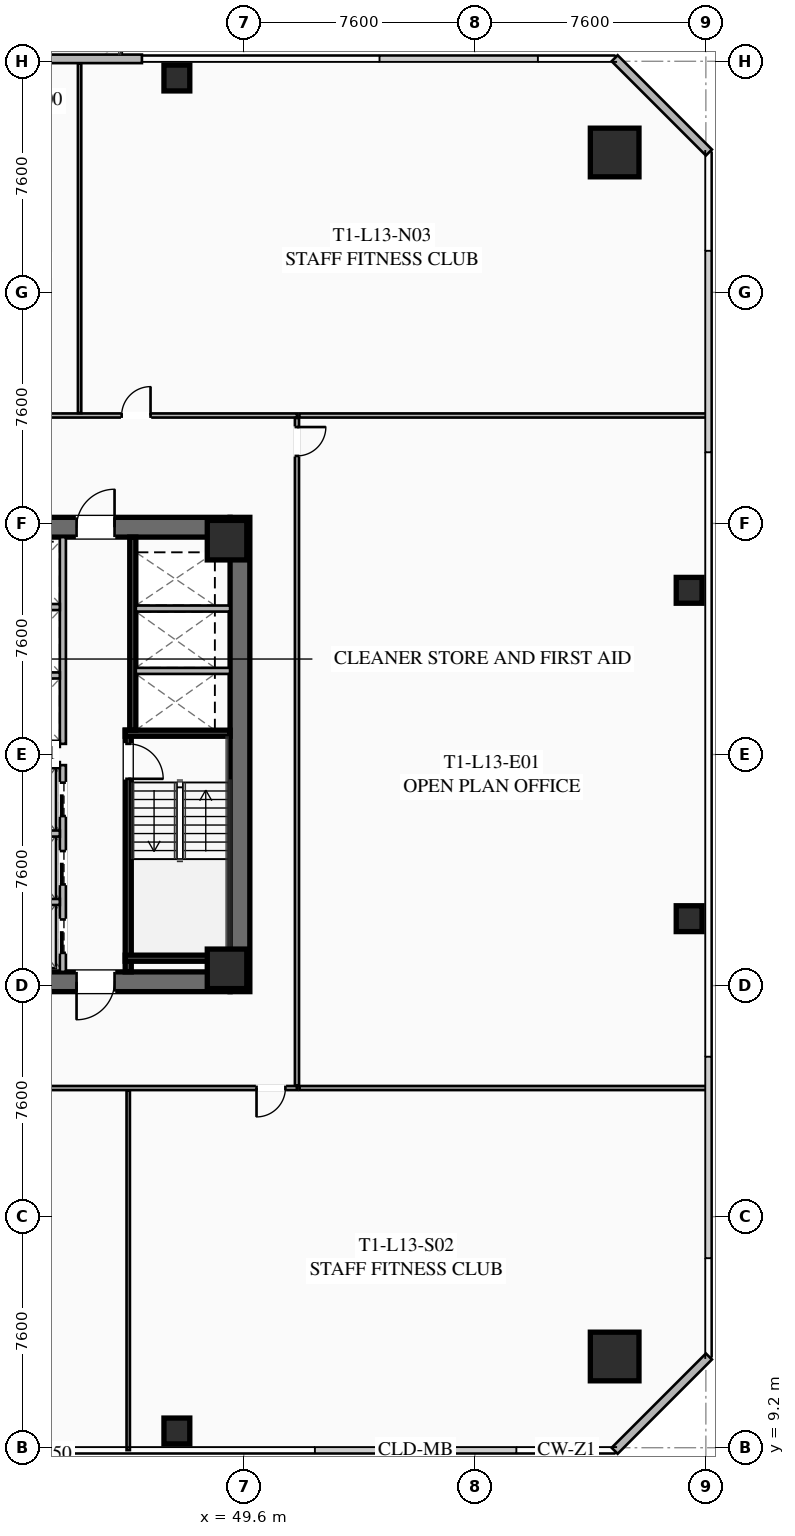
"""IFC4 building model, lengths in metres.
Left out: names, types, materials, properties, quantities, classifications, styles, units other than length and angle.
Written with IfcOpenShell. Run it as: python <this file> out.ifc"""

import sys

from ifc_helpers import new_model, si_unit, direction, frame, frame_2d, origin, origin_2d, place, context, subcontext, project, spatial, rectangle, hollow_rectangle, extrude, element, fill, save


model = new_model("IFC4")
c1 = context("Model", 3, precision=1e-05, world=origin(), true_north=direction((0.0, 1.0)))
c2 = subcontext(c1, "Body", "Model", "MODEL_VIEW")
j1 = project(units=[si_unit("LENGTHUNIT", "METRE"), si_unit("PLANEANGLEUNIT", "RADIAN")], contexts=[c1])
p1 = place(None, origin())
s1 = spatial("IfcSite", under=j1, at=p1, CompositionType="ELEMENT")
p2 = place(p1, origin())
s2 = spatial("IfcBuilding", under=s1, at=p2, CompositionType="ELEMENT")
p3 = place(p2, frame((0.0, 0.0, 53.0)))
s3 = spatial("IfcBuildingStorey", under=s2, at=p3, CompositionType="ELEMENT", Elevation=53.0)
p4 = place(p3, frame((49.475, 39.8, 0.0), z_axis=(0.0, 0.0, 1.0), x_axis=(0.0, -1.0, 0.0)))
e1 = element("IfcWall", 1, at=p4, inside=s3, PredefinedType="SHEAR", context=c2, shape_type="SweptSolid", body=[
    extrude(rectangle(XDim=15.6, YDim=0.65, at=frame_2d((7.8, 0.0))), origin(), (0.0, 0.0, 1.0), 3.55),
])
p5 = place(p3, frame((49.15, 24.525, 0.0), z_axis=(0.0, 0.0, 1.0), x_axis=(-1.0, 0.0, 0.0)))
e2 = element("IfcWall", 2, at=p5, inside=s3, PredefinedType="SHEAR", context=c2, shape_type="SweptSolid", body=[
    extrude(rectangle(XDim=14.3, YDim=0.65, at=frame_2d((7.15, 0.0))), origin(), (0.0, 0.0, 1.0), 3.55),
])
p6 = place(p5, frame((8.85, 0.0, 0.0)))
e3 = element("IfcOpeningElement", 3, at=p6, cuts=e2, PredefinedType="OPENING", context=c2, shape_type="SweptSolid", body=[
    extrude(rectangle(XDim=1.25, YDim=2.25, at=frame_2d((0.625, 1.125))), frame((0.0, 0.335, 0.0), z_axis=(0.0, -1.0, 0.0), x_axis=(1.0, 0.0, 0.0)), (0.0, 0.0, 1.0), 0.67),
])
p7 = place(p5, frame((3.8, 0.0, 0.0)))
e4 = element("IfcOpeningElement", 4, at=p7, cuts=e2, PredefinedType="OPENING", context=c2, shape_type="SweptSolid", body=[
    extrude(rectangle(XDim=1.25, YDim=2.25, at=frame_2d((0.625, 1.125))), frame((0.0, 0.335, 0.0), z_axis=(0.0, -1.0, 0.0), x_axis=(1.0, 0.0, 0.0)), (0.0, 0.0, 1.0), 0.67),
])
p8 = place(p3, frame((34.85, 39.475, 0.0), z_axis=(0.0, 0.0, 1.0), x_axis=(1.0, 0.0, 0.0)))
e5 = element("IfcWall", 5, at=p8, inside=s3, PredefinedType="SHEAR", context=c2, shape_type="SweptSolid", body=[
    extrude(rectangle(XDim=14.3, YDim=0.65, at=frame_2d((7.15, 0.0))), origin(), (0.0, 0.0, 1.0), 3.55),
])
p9 = place(p8, frame((4.2, 0.0, 0.0)))
e6 = element("IfcOpeningElement", 6, at=p9, cuts=e5, PredefinedType="OPENING", context=c2, shape_type="SweptSolid", body=[
    extrude(rectangle(XDim=1.25, YDim=2.25, at=frame_2d((0.625, 1.125))), frame((0.0, 0.335, 0.0), z_axis=(0.0, -1.0, 0.0), x_axis=(1.0, 0.0, 0.0)), (0.0, 0.0, 1.0), 0.67),
])
p10 = place(p8, frame((9.25, 0.0, 0.0)))
e7 = element("IfcOpeningElement", 7, at=p10, cuts=e5, PredefinedType="OPENING", context=c2, shape_type="SweptSolid", body=[
    extrude(rectangle(XDim=1.25, YDim=2.25, at=frame_2d((0.625, 1.125))), frame((0.0, 0.335, 0.0), z_axis=(0.0, -1.0, 0.0), x_axis=(1.0, 0.0, 0.0)), (0.0, 0.0, 1.0), 0.67),
])
for number, where, z_axis, x_axis in (
    (8, (49.05, 24.95, 0.0), (0.0, 0.0, 1.0), (1.0, 0.0, 0.0)),
    (9, (49.05, 39.05, 0.0), (0.0, 0.0, 1.0), (1.0, 0.0, 0.0)),
):
    element("IfcColumn", number, at=place(p3, frame(where, z_axis=z_axis, x_axis=x_axis)), inside=s3, PredefinedType="COLUMN", context=c2, shape_type="SweptSolid", body=[
        extrude(hollow_rectangle(XDim=1.3, YDim=1.3, WallThickness=0.05, at=origin_2d()), origin(), (0.0, 0.0, 1.0), 3.35),
    ])
for number, where, z_axis, x_axis in (
    (10, (61.8, 12.2, 0.0), (0.0, 0.0, 1.0), (1.0, 0.0, 0.0)),
    (11, (61.8, 51.8, 0.0), (0.0, 0.0, 1.0), (1.0, 0.0, 0.0)),
):
    element("IfcColumn", number, at=place(p3, frame(where, z_axis=z_axis, x_axis=x_axis)), inside=s3, PredefinedType="COLUMN", context=c2, shape_type="SweptSolid", body=[
        extrude(hollow_rectangle(XDim=1.6, YDim=1.6, WallThickness=0.06, at=origin_2d()), origin(), (0.0, 0.0, 1.0), 3.35),
    ])
for number, where, z_axis, x_axis in (
    (12, (47.4, 9.75, 0.0), (0.0, 0.0, 1.0), (1.0, 0.0, 0.0)),
    (13, (64.25, 26.6, 0.0), (0.0, 0.0, 1.0), (1.0, 0.0, 0.0)),
    (14, (64.25, 37.4, 0.0), (0.0, 0.0, 1.0), (1.0, 0.0, 0.0)),
    (15, (47.4, 54.25, 0.0), (0.0, 0.0, 1.0), (1.0, 0.0, 0.0)),
):
    element("IfcColumn", number, at=place(p3, frame(where, z_axis=z_axis, x_axis=x_axis)), inside=s3, PredefinedType="COLUMN", context=c2, shape_type="SweptSolid", body=[
        extrude(hollow_rectangle(XDim=0.85, YDim=0.85, WallThickness=0.035, at=origin_2d()), origin(), (0.0, 0.0, 1.0), 3.35),
    ])
p11 = place(p3, frame((37.75, 54.88, 0.0), z_axis=(0.0, 0.0, 1.0), x_axis=(1.0, 0.0, 0.0)))
e16 = element("IfcWall", 16, at=p11, inside=s3, PredefinedType="SOLIDWALL", context=c2, shape_type="SweptSolid", body=[
    extrude(rectangle(XDim=8.5, YDim=0.28, at=frame_2d((4.25, 0.0))), origin(), (0.0, 0.0, 1.0), 3.35),
])
p12 = place(p11, frame((3.6, 0.0, 0.0)))
e17 = element("IfcOpeningElement", 17, at=p12, cuts=e16, PredefinedType="OPENING", context=c2, shape_type="SweptSolid", body=[
    extrude(rectangle(XDim=1.3, YDim=2.15, at=frame_2d((0.65, 1.075))), frame((0.0, 0.15, 0.0), z_axis=(0.0, -1.0, 0.0), x_axis=(1.0, 0.0, 0.0)), (0.0, 0.0, 1.0), 0.3),
])
p13 = place(p11, frame((1.46, 0.0, 0.85)))
e18 = element("IfcOpeningElement", 18, at=p13, cuts=e16, PredefinedType="OPENING", context=c2, shape_type="SweptSolid", body=[
    extrude(rectangle(XDim=1.8, YDim=1.92, at=frame_2d((0.9, 0.96))), frame((0.0, 0.15, 0.0), z_axis=(0.0, -1.0, 0.0), x_axis=(1.0, 0.0, 0.0)), (0.0, 0.0, 1.0), 0.3),
])
for number, where, z_axis, x_axis in (
    (19, (61.8, 54.9, 0.0), (0.0, 0.0, 1.0), (0.707, -0.707, 0.0)),
    (20, (64.9, 12.2, 0.0), (0.0, 0.0, 1.0), (-0.707, -0.707, 0.0)),
):
    element("IfcWall", number, at=place(p3, frame(where, z_axis=z_axis, x_axis=x_axis)), inside=s3, PredefinedType="SOLIDWALL", context=c2, shape_type="SweptSolid", body=[
        extrude(rectangle(XDim=4.384, YDim=0.28, at=frame_2d((2.192, 0.0))), origin(), (0.0, 0.0, 1.0), 3.35),
    ])
p14 = place(p3, frame((45.8, 32.8, 0.0), z_axis=(0.0, 0.0, 1.0), x_axis=(0.0, -1.0, 0.0)))
e21 = element("IfcWall", 21, at=p14, inside=s3, PredefinedType="SHEAR", context=c2, shape_type="SweptSolid", body=[
    extrude(rectangle(XDim=7.95, YDim=0.2, at=frame_2d((3.975, 0.0))), origin(), (0.0, 0.0, 1.0), 3.35),
])
p15 = place(p14, frame((0.45, 0.0, 0.0)))
e22 = element("IfcOpeningElement", 22, at=p15, cuts=e21, PredefinedType="OPENING", context=c2, shape_type="SweptSolid", body=[
    extrude(rectangle(XDim=1.15, YDim=2.2, at=frame_2d((0.575, 1.1))), frame((0.0, 0.11, 0.0), z_axis=(0.0, -1.0, 0.0), x_axis=(1.0, 0.0, 0.0)), (0.0, 0.0, 1.0), 0.22),
])
for number, where, z_axis, x_axis in (
    (23, (45.7, 32.7, 0.0), (0.0, 0.0, 1.0), (1.0, 0.0, 0.0)),
    (24, (45.7, 25.3, 0.0), (0.0, 0.0, 1.0), (1.0, 0.0, 0.0)),
):
    element("IfcWall", number, at=place(p3, frame(where, z_axis=z_axis, x_axis=x_axis)), inside=s3, PredefinedType="SHEAR", context=c2, shape_type="SweptSolid", body=[
        extrude(rectangle(XDim=3.45, YDim=0.2, at=frame_2d((1.725, 0.0))), origin(), (0.0, 0.0, 1.0), 3.35),
    ])
p16 = place(p3, frame((45.95, 39.15, 0.0), z_axis=(0.0, 0.0, 1.0), x_axis=(0.0, -1.0, 0.0)))
e25 = element("IfcWall", 25, at=p16, inside=s3, PredefinedType="SHEAR", context=c2, shape_type="SweptSolid", body=[
    extrude(rectangle(XDim=6.35, YDim=0.2, at=frame_2d((3.175, 0.0))), origin(), (0.0, 0.0, 1.0), 3.35),
])
for number, where, z_axis, x_axis in (
    (26, (46.05, 34.75, 0.0), (0.0, 0.0, 1.0), (1.0, 0.0, 0.0)),
    (27, (46.05, 36.8, 0.0), (0.0, 0.0, 1.0), (1.0, 0.0, 0.0)),
):
    element("IfcWall", number, at=place(p3, frame(where, z_axis=z_axis, x_axis=x_axis)), inside=s3, PredefinedType="SOLIDWALL", context=c2, shape_type="SweptSolid", body=[
        extrude(rectangle(XDim=3.1, YDim=0.2, at=frame_2d((1.55, 0.0))), origin(), (0.0, 0.0, 1.0), 3.35),
    ])
p17 = place(p3, frame((43.65, 24.85, 0.0), z_axis=(0.0, 0.0, 1.0), x_axis=(0.0, 1.0, 0.0)))
e28 = element("IfcWall", 28, at=p17, inside=s3, PredefinedType="SOLIDWALL", context=c2, shape_type="SweptSolid", body=[
    extrude(rectangle(XDim=6.8, YDim=0.2, at=frame_2d((3.4, 0.0))), origin(), (0.0, 0.0, 1.0), 3.35),
])
p18 = place(p17, frame((0.625, 0.0, 0.0)))
e29 = element("IfcOpeningElement", 29, at=p18, cuts=e28, PredefinedType="OPENING", context=c2, shape_type="SweptSolid", body=[
    extrude(rectangle(XDim=1.1, YDim=2.2, at=frame_2d((0.55, 1.1))), frame((0.0, 0.11, 0.0), z_axis=(0.0, -1.0, 0.0), x_axis=(1.0, 0.0, 0.0)), (0.0, 0.0, 1.0), 0.22),
])
p19 = place(p17, frame((2.875, 0.0, 0.0)))
e30 = element("IfcOpeningElement", 30, at=p19, cuts=e28, PredefinedType="OPENING", context=c2, shape_type="SweptSolid", body=[
    extrude(rectangle(XDim=1.1, YDim=2.2, at=frame_2d((0.55, 1.1))), frame((0.0, 0.11, 0.0), z_axis=(0.0, -1.0, 0.0), x_axis=(1.0, 0.0, 0.0)), (0.0, 0.0, 1.0), 0.22),
])
p20 = place(p17, frame((5.125, 0.0, 0.0)))
e31 = element("IfcOpeningElement", 31, at=p20, cuts=e28, PredefinedType="OPENING", context=c2, shape_type="SweptSolid", body=[
    extrude(rectangle(XDim=1.1, YDim=2.2, at=frame_2d((0.55, 1.1))), frame((0.0, 0.11, 0.0), z_axis=(0.0, -1.0, 0.0), x_axis=(1.0, 0.0, 0.0)), (0.0, 0.0, 1.0), 0.22),
])
for number, where, z_axis, x_axis in (
    (32, (41.67, 27.15, 0.0), (0.0, 0.0, 1.0), (1.0, 0.0, 0.0)),
    (33, (41.67, 29.4, 0.0), (0.0, 0.0, 1.0), (1.0, 0.0, 0.0)),
    (34, (41.67, 31.65, 0.0), (0.0, 0.0, 1.0), (1.0, 0.0, 0.0)),
):
    element("IfcWall", number, at=place(p3, frame(where, z_axis=z_axis, x_axis=x_axis)), inside=s3, PredefinedType="SOLIDWALL", context=c2, shape_type="SweptSolid", body=[
        extrude(rectangle(XDim=1.88, YDim=0.2, at=frame_2d((0.94, 0.0))), origin(), (0.0, 0.0, 1.0), 3.35),
    ])
p21 = place(p3, frame((43.65, 32.35, 0.0), z_axis=(0.0, 0.0, 1.0), x_axis=(0.0, 1.0, 0.0)))
e35 = element("IfcWall", 35, at=p21, inside=s3, PredefinedType="SOLIDWALL", context=c2, shape_type="SweptSolid", body=[
    extrude(rectangle(XDim=6.8, YDim=0.2, at=frame_2d((3.4, 0.0))), origin(), (0.0, 0.0, 1.0), 3.35),
])
for number, where, z_axis, x_axis in (
    (36, (41.67, 32.35, 0.0), (0.0, 0.0, 1.0), (1.0, 0.0, 0.0)),
    (37, (41.67, 34.6, 0.0), (0.0, 0.0, 1.0), (1.0, 0.0, 0.0)),
    (38, (41.67, 36.85, 0.0), (0.0, 0.0, 1.0), (1.0, 0.0, 0.0)),
):
    element("IfcWall", number, at=place(p3, frame(where, z_axis=z_axis, x_axis=x_axis)), inside=s3, PredefinedType="SOLIDWALL", context=c2, shape_type="SweptSolid", body=[
        extrude(rectangle(XDim=1.88, YDim=0.2, at=frame_2d((0.94, 0.0))), origin(), (0.0, 0.0, 1.0), 3.35),
    ])
p22 = place(p3, frame((22.35, 43.15, 0.0), z_axis=(0.0, 0.0, 1.0), x_axis=(1.0, 0.0, 0.0)))
e39 = element("IfcWall", 39, at=p22, inside=s3, PredefinedType="PARTITIONING", context=c2, shape_type="SweptSolid", body=[
    extrude(rectangle(XDim=29.0, YDim=0.135, at=frame_2d((14.5, 0.0))), origin(), (0.0, 0.0, 1.0), 2.703),
])
p23 = place(p22, frame((0.3, 0.0, 0.0)))
e40 = element("IfcOpeningElement", 40, at=p23, cuts=e39, PredefinedType="OPENING", context=c2, shape_type="SweptSolid", body=[
    extrude(rectangle(XDim=0.95, YDim=2.05, at=frame_2d((0.475, 1.025))), frame((0.0, 0.077, 0.0), z_axis=(0.0, -1.0, 0.0), x_axis=(1.0, 0.0, 0.0)), (0.0, 0.0, 1.0), 0.155),
])
p24 = place(p22, frame((19.263, 0.0, 0.0)))
e41 = element("IfcOpeningElement", 41, at=p24, cuts=e39, PredefinedType="OPENING", context=c2, shape_type="SweptSolid", body=[
    extrude(rectangle(XDim=0.95, YDim=2.05, at=frame_2d((0.475, 1.025))), frame((0.0, 0.077, 0.0), z_axis=(0.0, -1.0, 0.0), x_axis=(1.0, 0.0, 0.0)), (0.0, 0.0, 1.0), 0.155),
])
p25 = place(p22, frame((23.234, 0.0, 0.0)))
e42 = element("IfcOpeningElement", 42, at=p25, cuts=e39, PredefinedType="OPENING", context=c2, shape_type="SweptSolid", body=[
    extrude(rectangle(XDim=0.95, YDim=2.05, at=frame_2d((0.475, 1.025))), frame((0.0, 0.077, 0.0), z_axis=(0.0, -1.0, 0.0), x_axis=(1.0, 0.0, 0.0)), (0.0, 0.0, 1.0), 0.155),
])
p26 = place(p3, frame((44.2, 43.23, 0.0), z_axis=(0.0, 0.0, 1.0), x_axis=(0.0, 1.0, 0.0)))
e43 = element("IfcWall", 43, at=p26, inside=s3, PredefinedType="PARTITIONING", context=c2, shape_type="SweptSolid", body=[
    extrude(rectangle(XDim=11.5, YDim=0.11, at=frame_2d((5.75, 0.0))), origin(), (0.0, 0.0, 1.0), 2.703),
])
p27 = place(p3, frame((51.35, 21.03, 0.0), z_axis=(0.0, 0.0, 1.0), x_axis=(-1.0, 0.0, 0.0)))
e44 = element("IfcWall", 44, at=p27, inside=s3, PredefinedType="PARTITIONING", context=c2, shape_type="SweptSolid", body=[
    extrude(rectangle(XDim=29.0, YDim=0.135, at=frame_2d((14.5, 0.0))), origin(), (0.0, 0.0, 1.0), 2.703),
])
p28 = place(p27, frame((27.67, 0.0, 0.0)))
e45 = element("IfcOpeningElement", 45, at=p28, cuts=e44, PredefinedType="OPENING", context=c2, shape_type="SweptSolid", body=[
    extrude(rectangle(XDim=0.95, YDim=2.05, at=frame_2d((0.475, 1.025))), frame((0.0, 0.077, 0.0), z_axis=(0.0, -1.0, 0.0), x_axis=(1.0, 0.0, 0.0)), (0.0, 0.0, 1.0), 0.155),
])
p29 = place(p27, frame((0.38, 0.0, 0.0)))
e46 = element("IfcOpeningElement", 46, at=p29, cuts=e44, PredefinedType="OPENING", context=c2, shape_type="SweptSolid", body=[
    extrude(rectangle(XDim=0.95, YDim=2.05, at=frame_2d((0.475, 1.025))), frame((0.0, 0.077, 0.0), z_axis=(0.0, -1.0, 0.0), x_axis=(1.0, 0.0, 0.0)), (0.0, 0.0, 1.0), 0.155),
])
p30 = place(p3, frame((45.8, 9.12, 0.0), z_axis=(0.0, 0.0, 1.0), x_axis=(0.0, 1.0, 0.0)))
e47 = element("IfcWall", 47, at=p30, inside=s3, PredefinedType="PARTITIONING", context=c2, shape_type="SweptSolid", body=[
    extrude(rectangle(XDim=11.83, YDim=0.11, at=frame_2d((5.915, 0.0))), origin(), (0.0, 0.0, 1.0), 2.703),
])
p31 = place(p3, frame((51.35, 43.07, 0.0), z_axis=(0.0, 0.0, 1.0), x_axis=(0.0, -1.0, 0.0)))
e48 = element("IfcWall", 48, at=p31, inside=s3, PredefinedType="PARTITIONING", context=c2, shape_type="SweptSolid", body=[
    extrude(rectangle(XDim=21.96, YDim=0.135, at=frame_2d((10.98, 0.0))), origin(), (0.0, 0.0, 1.0), 2.703),
])
p32 = place(p31, frame((0.3, 0.0, 0.0)))
e49 = element("IfcOpeningElement", 49, at=p32, cuts=e48, PredefinedType="OPENING", context=c2, shape_type="SweptSolid", body=[
    extrude(rectangle(XDim=0.95, YDim=2.05, at=frame_2d((0.475, 1.025))), frame((0.0, 0.077, 0.0), z_axis=(0.0, -1.0, 0.0), x_axis=(1.0, 0.0, 0.0)), (0.0, 0.0, 1.0), 0.155),
])
for number, where, z_axis, x_axis in (
    (50, (64.88, 43.15, 0.0), (0.0, 0.0, 1.0), (-1.0, 0.0, 0.0)),
    (51, (51.43, 21.03, 0.0), (0.0, 0.0, 1.0), (1.0, 0.0, 0.0)),
):
    element("IfcWall", number, at=place(p3, frame(where, z_axis=z_axis, x_axis=x_axis)), inside=s3, PredefinedType="PARTITIONING", context=c2, shape_type="SweptSolid", body=[
        extrude(rectangle(XDim=13.45, YDim=0.135, at=frame_2d((6.725, 0.0))), origin(), (0.0, 0.0, 1.0), 2.703),
    ])
p33 = place(p10, origin())
e52 = element("IfcDoor", 52, at=p33, inside=s3, OperationType="SINGLE_SWING_RIGHT", PredefinedType="DOOR", context=c2, shape_type="SweptSolid", body=[
    extrude(rectangle(XDim=1.25, YDim=2.25, at=frame_2d((0.625, 1.125))), frame((0.0, 0.025, 0.0), z_axis=(0.0, -1.0, 0.0), x_axis=(1.0, 0.0, 0.0)), (0.0, 0.0, 1.0), 0.05),
])
fill(e7, e52)
p34 = place(p7, origin())
e53 = element("IfcDoor", 53, at=p34, inside=s3, OperationType="SINGLE_SWING_RIGHT", PredefinedType="DOOR", context=c2, shape_type="SweptSolid", body=[
    extrude(rectangle(XDim=1.25, YDim=2.25, at=frame_2d((0.625, 1.125))), frame((0.0, 0.025, 0.0), z_axis=(0.0, -1.0, 0.0), x_axis=(1.0, 0.0, 0.0)), (0.0, 0.0, 1.0), 0.05),
])
fill(e4, e53)
p35 = place(p15, origin())
e54 = element("IfcDoor", 54, at=p35, inside=s3, OperationType="SINGLE_SWING_RIGHT", PredefinedType="DOOR", context=c2, shape_type="SweptSolid", body=[
    extrude(rectangle(XDim=1.15, YDim=2.2, at=frame_2d((0.575, 1.1))), frame((0.0, 0.025, 0.0), z_axis=(0.0, -1.0, 0.0), x_axis=(1.0, 0.0, 0.0)), (0.0, 0.0, 1.0), 0.05),
])
fill(e22, e54)
p36 = place(p25, origin())
e55 = element("IfcDoor", 55, at=p36, inside=s3, OperationType="SINGLE_SWING_RIGHT", PredefinedType="DOOR", context=c2, shape_type="SweptSolid", body=[
    extrude(rectangle(XDim=0.95, YDim=2.05, at=frame_2d((0.475, 1.025))), frame((0.0, 0.025, 0.0), z_axis=(0.0, -1.0, 0.0), x_axis=(1.0, 0.0, 0.0)), (0.0, 0.0, 1.0), 0.05),
])
fill(e42, e55)
p37 = place(p29, origin())
e56 = element("IfcDoor", 56, at=p37, inside=s3, OperationType="SINGLE_SWING_RIGHT", PredefinedType="DOOR", context=c2, shape_type="SweptSolid", body=[
    extrude(rectangle(XDim=0.95, YDim=2.05, at=frame_2d((0.475, 1.025))), frame((0.0, 0.025, 0.0), z_axis=(0.0, -1.0, 0.0), x_axis=(1.0, 0.0, 0.0)), (0.0, 0.0, 1.0), 0.05),
])
fill(e46, e56)
p38 = place(p32, origin())
e57 = element("IfcDoor", 57, at=p38, inside=s3, OperationType="SINGLE_SWING_LEFT", PredefinedType="DOOR", context=c2, shape_type="SweptSolid", body=[
    extrude(rectangle(XDim=0.95, YDim=2.05, at=frame_2d((0.475, 1.025))), frame((0.0, 0.025, 0.0), z_axis=(0.0, -1.0, 0.0), x_axis=(1.0, 0.0, 0.0)), (0.0, 0.0, 1.0), 0.05),
])
fill(e49, e57)
p39 = place(p18, origin())
e58 = element("IfcDoor", 58, at=p39, inside=s3, OperationType="SLIDING_TO_LEFT", PredefinedType="DOOR", context=c2, shape_type="SweptSolid", body=[
    extrude(rectangle(XDim=1.1, YDim=2.2, at=frame_2d((0.55, 1.1))), frame((0.0, 0.025, 0.0), z_axis=(0.0, -1.0, 0.0), x_axis=(1.0, 0.0, 0.0)), (0.0, 0.0, 1.0), 0.05),
])
fill(e29, e58)
p40 = place(p19, origin())
e59 = element("IfcDoor", 59, at=p40, inside=s3, OperationType="SLIDING_TO_LEFT", PredefinedType="DOOR", context=c2, shape_type="SweptSolid", body=[
    extrude(rectangle(XDim=1.1, YDim=2.2, at=frame_2d((0.55, 1.1))), frame((0.0, 0.025, 0.0), z_axis=(0.0, -1.0, 0.0), x_axis=(1.0, 0.0, 0.0)), (0.0, 0.0, 1.0), 0.05),
])
fill(e30, e59)
p41 = place(p20, origin())
e60 = element("IfcDoor", 60, at=p41, inside=s3, OperationType="SLIDING_TO_LEFT", PredefinedType="DOOR", context=c2, shape_type="SweptSolid", body=[
    extrude(rectangle(XDim=1.1, YDim=2.2, at=frame_2d((0.55, 1.1))), frame((0.0, 0.025, 0.0), z_axis=(0.0, -1.0, 0.0), x_axis=(1.0, 0.0, 0.0)), (0.0, 0.0, 1.0), 0.05),
])
fill(e31, e60)
save(model, sys.argv[1])
